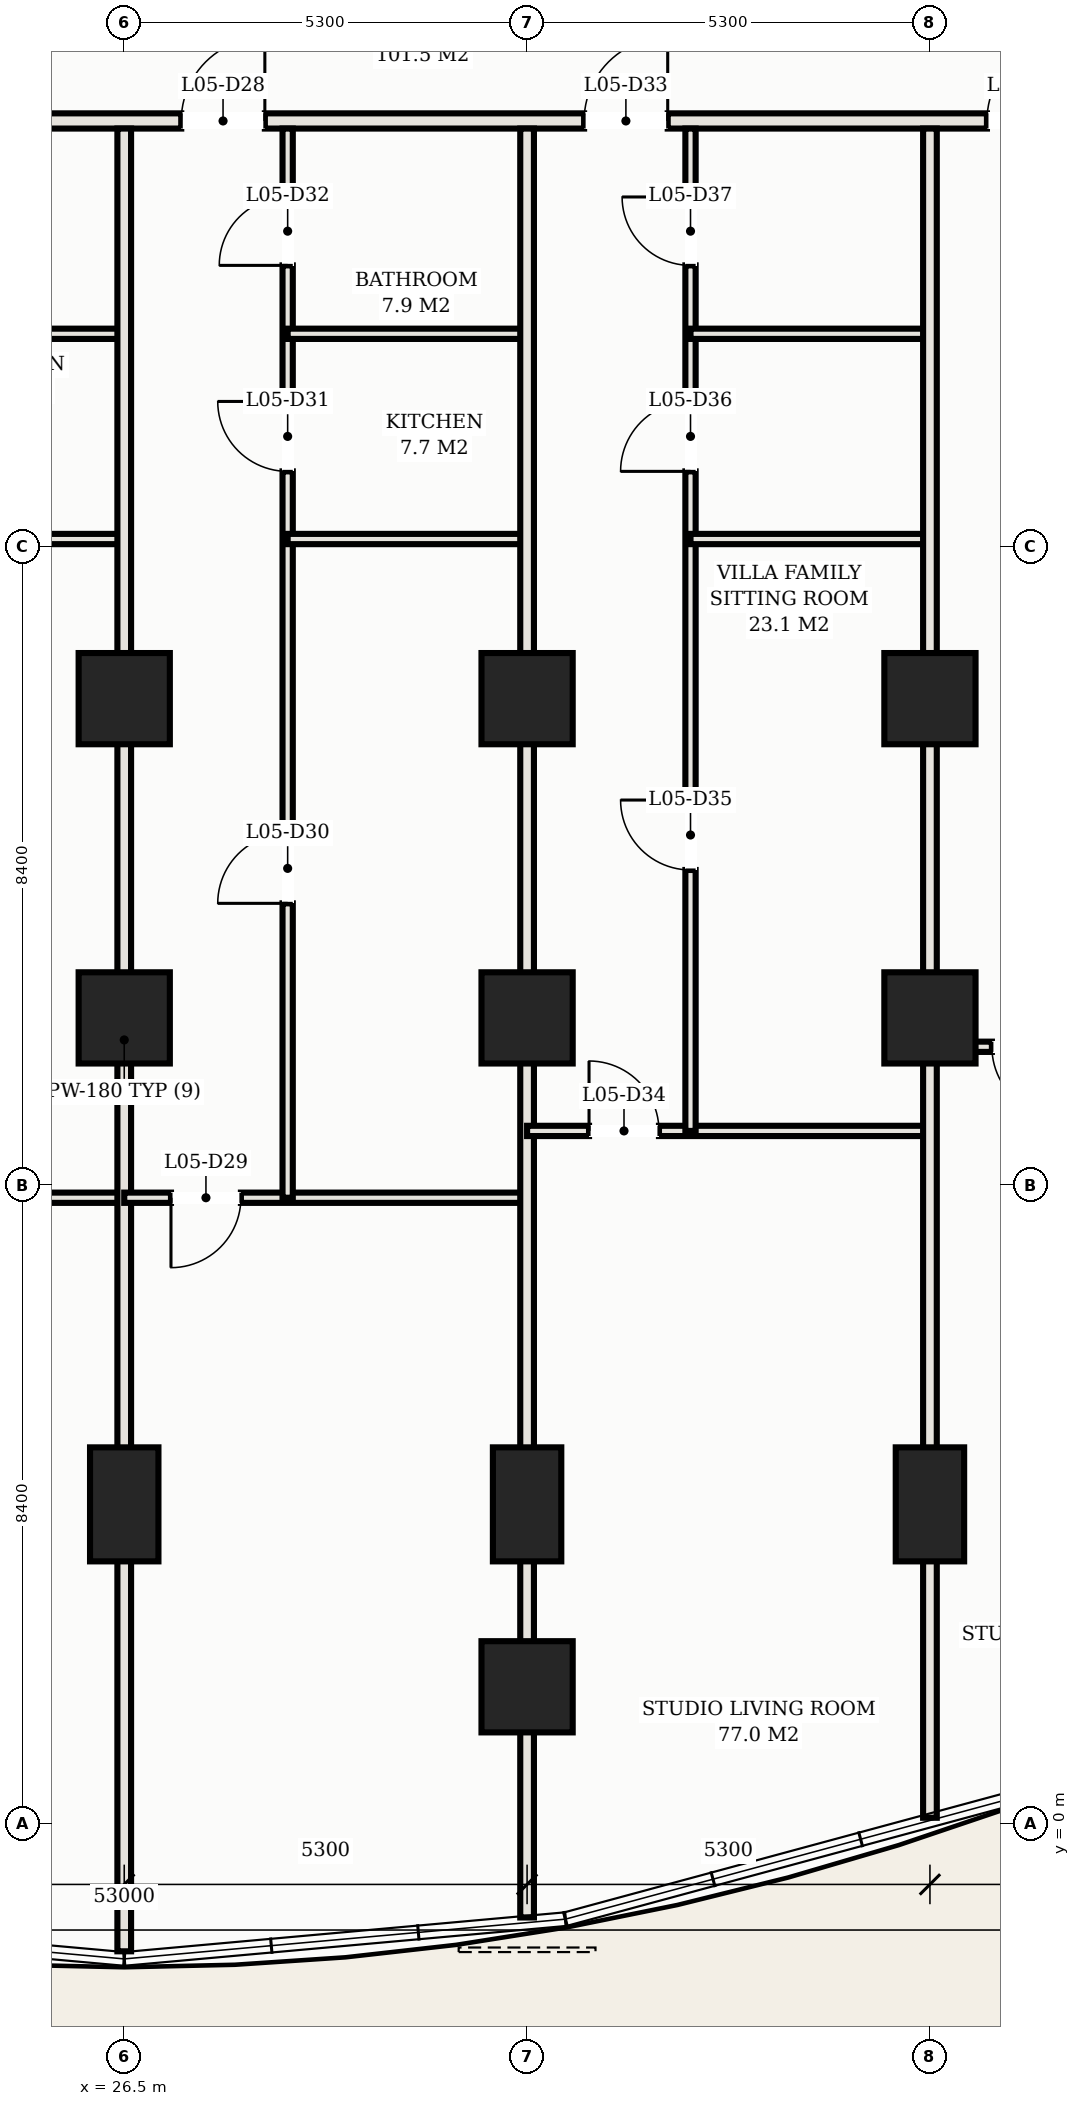
"""IFC4 building model, lengths in metres.
Left out: names, types, materials, properties, quantities, classifications, styles, units other than length and angle.
Written with IfcOpenShell. Run it as: python <this file> out.ifc"""

import sys

from ifc_helpers import new_model, si_unit, direction, frame, frame_2d, origin, origin_2d, place, context, subcontext, project, spatial, rectangle, hollow_rectangle, extrude, element, fill, save


model = new_model("IFC4")
c1 = context("Model", 3, precision=1e-05, world=origin(), true_north=direction((0.0, 1.0)))
c2 = subcontext(c1, "Body", "Model", "MODEL_VIEW")
j1 = project(units=[si_unit("LENGTHUNIT", "METRE"), si_unit("PLANEANGLEUNIT", "RADIAN")], contexts=[c1])
p1 = place(None, origin())
s1 = spatial("IfcSite", under=j1, at=p1, CompositionType="ELEMENT")
p2 = place(p1, origin())
s2 = spatial("IfcBuilding", under=s1, at=p2, CompositionType="ELEMENT")
p3 = place(p2, frame((0.0, 0.0, 24.2)))
s3 = spatial("IfcBuildingStorey", under=s2, at=p3, CompositionType="ELEMENT", Elevation=24.2)
for number, where, z_axis, x_axis in (
    (1, (26.5, 14.8, 0.0), (0.0, 0.0, 1.0), (1.0, 0.0, 0.0)),
    (2, (26.5, 10.6, 0.0), (0.0, 0.0, 1.0), (1.0, 0.0, 0.0)),
    (3, (31.8, 14.8, 0.0), (0.0, 0.0, 1.0), (1.0, 0.0, 0.0)),
    (4, (31.8, 10.6, 0.0), (0.0, 0.0, 1.0), (1.0, 0.0, 0.0)),
    (5, (37.1, 14.8, 0.0), (0.0, 0.0, 1.0), (1.0, 0.0, 0.0)),
    (6, (37.1, 10.6, 0.0), (0.0, 0.0, 1.0), (1.0, 0.0, 0.0)),
    (7, (31.8, 1.8, 0.0), (0.0, 0.0, 1.0), (1.0, 0.0, 0.0)),
):
    element("IfcColumn", number, at=place(p3, frame(where, z_axis=z_axis, x_axis=x_axis)), inside=s3, PredefinedType="COLUMN", context=c2, shape_type="SweptSolid", body=[
        extrude(hollow_rectangle(XDim=1.2, YDim=1.2, WallThickness=0.04, at=origin_2d()), origin(), (0.0, 0.0, 1.0), 3.3),
    ])
for number, where, z_axis, x_axis in (
    (8, (26.5, 4.2, 0.0), (0.0, 0.0, 1.0), (1.0, 0.0, 0.0)),
    (9, (31.8, 4.2, 0.0), (0.0, 0.0, 1.0), (1.0, 0.0, 0.0)),
    (10, (37.1, 4.2, 0.0), (0.0, 0.0, 1.0), (1.0, 0.0, 0.0)),
):
    element("IfcColumn", number, at=place(p3, frame(where, z_axis=z_axis, x_axis=x_axis)), inside=s3, PredefinedType="COLUMN", context=c2, shape_type="SweptSolid", body=[
        extrude(hollow_rectangle(XDim=0.9, YDim=1.5, WallThickness=0.036, at=origin_2d()), origin(), (0.0, 0.0, 1.0), 3.3),
    ])
p4 = place(p3, frame((0.12, 22.4, 0.0), z_axis=(0.0, 0.0, 1.0), x_axis=(1.0, 0.0, 0.0)))
e11 = element("IfcWall", 11, at=p4, inside=s3, PredefinedType="PARTITIONING", context=c2, shape_type="SweptSolid", body=[
    extrude(rectangle(XDim=52.76, YDim=0.2, at=frame_2d((26.38, 0.0))), origin(), (0.0, 0.0, 1.0), 2.57),
])
p5 = place(p4, frame((11.23, 0.0, 0.0)))
e12 = element("IfcOpeningElement", 12, at=p5, cuts=e11, PredefinedType="OPENING", context=c2, shape_type="SweptSolid", body=[
    extrude(rectangle(XDim=1.1, YDim=2.25, at=frame_2d((0.55, 1.125))), frame((0.0, 0.11, 0.0), z_axis=(0.0, -1.0, 0.0), x_axis=(1.0, 0.0, 0.0)), (0.0, 0.0, 1.0), 0.22),
])
p6 = place(p4, frame((16.53, 0.0, 0.0)))
e13 = element("IfcOpeningElement", 13, at=p6, cuts=e11, PredefinedType="OPENING", context=c2, shape_type="SweptSolid", body=[
    extrude(rectangle(XDim=1.1, YDim=2.25, at=frame_2d((0.55, 1.125))), frame((0.0, 0.11, 0.0), z_axis=(0.0, -1.0, 0.0), x_axis=(1.0, 0.0, 0.0)), (0.0, 0.0, 1.0), 0.22),
])
p7 = place(p4, frame((21.83, 0.0, 0.0)))
e14 = element("IfcOpeningElement", 14, at=p7, cuts=e11, PredefinedType="OPENING", context=c2, shape_type="SweptSolid", body=[
    extrude(rectangle(XDim=1.1, YDim=2.25, at=frame_2d((0.55, 1.125))), frame((0.0, 0.11, 0.0), z_axis=(0.0, -1.0, 0.0), x_axis=(1.0, 0.0, 0.0)), (0.0, 0.0, 1.0), 0.22),
])
p8 = place(p4, frame((27.13, 0.0, 0.0)))
e15 = element("IfcOpeningElement", 15, at=p8, cuts=e11, PredefinedType="OPENING", context=c2, shape_type="SweptSolid", body=[
    extrude(rectangle(XDim=1.1, YDim=2.25, at=frame_2d((0.55, 1.125))), frame((0.0, 0.11, 0.0), z_axis=(0.0, -1.0, 0.0), x_axis=(1.0, 0.0, 0.0)), (0.0, 0.0, 1.0), 0.22),
])
p9 = place(p4, frame((32.43, 0.0, 0.0)))
e16 = element("IfcOpeningElement", 16, at=p9, cuts=e11, PredefinedType="OPENING", context=c2, shape_type="SweptSolid", body=[
    extrude(rectangle(XDim=1.1, YDim=2.25, at=frame_2d((0.55, 1.125))), frame((0.0, 0.11, 0.0), z_axis=(0.0, -1.0, 0.0), x_axis=(1.0, 0.0, 0.0)), (0.0, 0.0, 1.0), 0.22),
])
p10 = place(p4, frame((37.73, 0.0, 0.0)))
e17 = element("IfcOpeningElement", 17, at=p10, cuts=e11, PredefinedType="OPENING", context=c2, shape_type="SweptSolid", body=[
    extrude(rectangle(XDim=1.1, YDim=2.25, at=frame_2d((0.55, 1.125))), frame((0.0, 0.11, 0.0), z_axis=(0.0, -1.0, 0.0), x_axis=(1.0, 0.0, 0.0)), (0.0, 0.0, 1.0), 0.22),
])
p11 = place(p4, frame((4.735, 0.0, 0.0)))
e18 = element("IfcOpeningElement", 18, at=p11, cuts=e11, PredefinedType="OPENING", context=c2, shape_type="SweptSolid", body=[
    extrude(rectangle(XDim=0.92, YDim=2.15, at=frame_2d((0.46, 1.075))), frame((0.0, 0.11, 0.0), z_axis=(0.0, -1.0, 0.0), x_axis=(1.0, 0.0, 0.0)), (0.0, 0.0, 1.0), 0.22),
])
p12 = place(p4, frame((47.105, 0.0, 0.0)))
e19 = element("IfcOpeningElement", 19, at=p12, cuts=e11, PredefinedType="OPENING", context=c2, shape_type="SweptSolid", body=[
    extrude(rectangle(XDim=0.92, YDim=2.15, at=frame_2d((0.46, 1.075))), frame((0.0, 0.11, 0.0), z_axis=(0.0, -1.0, 0.0), x_axis=(1.0, 0.0, 0.0)), (0.0, 0.0, 1.0), 0.22),
])
p13 = place(p3, frame((21.2, 8.234, 0.0), z_axis=(0.0, 0.0, 1.0), x_axis=(1.0, 0.0, 0.0)))
e20 = element("IfcWall", 20, at=p13, inside=s3, PredefinedType="PARTITIONING", context=c2, shape_type="SweptSolid", body=[
    extrude(rectangle(XDim=5.3, YDim=0.135, at=frame_2d((2.65, 0.0))), origin(), (0.0, 0.0, 1.0), 2.57),
])
p14 = place(p13, frame((0.615, 0.0, 0.0)))
e21 = element("IfcOpeningElement", 21, at=p14, cuts=e20, PredefinedType="OPENING", context=c2, shape_type="SweptSolid", body=[
    extrude(rectangle(XDim=0.92, YDim=2.15, at=frame_2d((0.46, 1.075))), frame((0.0, 0.078, 0.0), z_axis=(0.0, -1.0, 0.0), x_axis=(1.0, 0.0, 0.0)), (0.0, 0.0, 1.0), 0.155),
])
for number, where, z_axis, x_axis in (
    (22, (23.35, 16.9, 0.0), (0.0, 0.0, 1.0), (1.0, 0.0, 0.0)),
    (23, (23.35, 19.6, 0.0), (0.0, 0.0, 1.0), (1.0, 0.0, 0.0)),
):
    element("IfcWall", number, at=place(p3, frame(where, z_axis=z_axis, x_axis=x_axis)), inside=s3, PredefinedType="PARTITIONING", context=c2, shape_type="SweptSolid", body=[
        extrude(rectangle(XDim=3.15, YDim=0.135, at=frame_2d((1.575, 0.0))), origin(), (0.0, 0.0, 1.0), 2.57),
    ])
p15 = place(p3, frame((26.5, -1.68, 0.0), z_axis=(0.0, 0.0, 1.0), x_axis=(0.0, 1.0, 0.0)))
e24 = element("IfcWall", 24, at=p15, inside=s3, PredefinedType="PARTITIONING", context=c2, shape_type="SweptSolid", body=[
    extrude(rectangle(XDim=23.98, YDim=0.18, at=frame_2d((11.99, 0.0))), origin(), (0.0, 0.0, 1.0), 2.275),
])
p16 = place(p3, frame((26.5, 8.234, 0.0), z_axis=(0.0, 0.0, 1.0), x_axis=(1.0, 0.0, 0.0)))
e25 = element("IfcWall", 25, at=p16, inside=s3, PredefinedType="PARTITIONING", context=c2, shape_type="SweptSolid", body=[
    extrude(rectangle(XDim=5.3, YDim=0.135, at=frame_2d((2.65, 0.0))), origin(), (0.0, 0.0, 1.0), 2.57),
])
p17 = place(p16, frame((0.615, 0.0, 0.0)))
e26 = element("IfcOpeningElement", 26, at=p17, cuts=e25, PredefinedType="OPENING", context=c2, shape_type="SweptSolid", body=[
    extrude(rectangle(XDim=0.92, YDim=2.15, at=frame_2d((0.46, 1.075))), frame((0.0, 0.078, 0.0), z_axis=(0.0, -1.0, 0.0), x_axis=(1.0, 0.0, 0.0)), (0.0, 0.0, 1.0), 0.155),
])
p18 = place(p3, frame((28.65, 8.234, 0.0), z_axis=(0.0, 0.0, 1.0), x_axis=(0.0, 1.0, 0.0)))
e27 = element("IfcWall", 27, at=p18, inside=s3, PredefinedType="PARTITIONING", context=c2, shape_type="SweptSolid", body=[
    extrude(rectangle(XDim=14.066, YDim=0.135, at=frame_2d((7.033, 0.0))), origin(), (0.0, 0.0, 1.0), 2.57),
])
p19 = place(p18, frame((3.873, 0.0, 0.0)))
e28 = element("IfcOpeningElement", 28, at=p19, cuts=e27, PredefinedType="OPENING", context=c2, shape_type="SweptSolid", body=[
    extrude(rectangle(XDim=0.92, YDim=2.15, at=frame_2d((0.46, 1.075))), frame((0.0, 0.078, 0.0), z_axis=(0.0, -1.0, 0.0), x_axis=(1.0, 0.0, 0.0)), (0.0, 0.0, 1.0), 0.155),
])
p20 = place(p18, frame((9.556, 0.0, 0.0)))
e29 = element("IfcOpeningElement", 29, at=p20, cuts=e27, PredefinedType="OPENING", context=c2, shape_type="SweptSolid", body=[
    extrude(rectangle(XDim=0.92, YDim=2.15, at=frame_2d((0.46, 1.075))), frame((0.0, 0.078, 0.0), z_axis=(0.0, -1.0, 0.0), x_axis=(1.0, 0.0, 0.0)), (0.0, 0.0, 1.0), 0.155),
])
p21 = place(p18, frame((12.266, 0.0, 0.0)))
e30 = element("IfcOpeningElement", 30, at=p21, cuts=e27, PredefinedType="OPENING", context=c2, shape_type="SweptSolid", body=[
    extrude(rectangle(XDim=0.9, YDim=2.15, at=frame_2d((0.45, 1.075))), frame((0.0, 0.078, 0.0), z_axis=(0.0, -1.0, 0.0), x_axis=(1.0, 0.0, 0.0)), (0.0, 0.0, 1.0), 0.155),
])
for number, where, z_axis, x_axis in (
    (31, (28.65, 16.9, 0.0), (0.0, 0.0, 1.0), (1.0, 0.0, 0.0)),
    (32, (28.65, 19.6, 0.0), (0.0, 0.0, 1.0), (1.0, 0.0, 0.0)),
):
    element("IfcWall", number, at=place(p3, frame(where, z_axis=z_axis, x_axis=x_axis)), inside=s3, PredefinedType="PARTITIONING", context=c2, shape_type="SweptSolid", body=[
        extrude(rectangle(XDim=3.15, YDim=0.135, at=frame_2d((1.575, 0.0))), origin(), (0.0, 0.0, 1.0), 2.57),
    ])
p22 = place(p3, frame((31.8, -1.235, 0.0), z_axis=(0.0, 0.0, 1.0), x_axis=(0.0, 1.0, 0.0)))
e33 = element("IfcWall", 33, at=p22, inside=s3, PredefinedType="PARTITIONING", context=c2, shape_type="SweptSolid", body=[
    extrude(rectangle(XDim=23.535, YDim=0.18, at=frame_2d((11.768, 0.0))), origin(), (0.0, 0.0, 1.0), 2.275),
])
p23 = place(p3, frame((31.8, 9.113, 0.0), z_axis=(0.0, 0.0, 1.0), x_axis=(1.0, 0.0, 0.0)))
e34 = element("IfcWall", 34, at=p23, inside=s3, PredefinedType="PARTITIONING", context=c2, shape_type="SweptSolid", body=[
    extrude(rectangle(XDim=5.3, YDim=0.135, at=frame_2d((2.65, 0.0))), origin(), (0.0, 0.0, 1.0), 2.57),
])
p24 = place(p23, frame((0.815, 0.0, 0.0)))
e35 = element("IfcOpeningElement", 35, at=p24, cuts=e34, PredefinedType="OPENING", context=c2, shape_type="SweptSolid", body=[
    extrude(rectangle(XDim=0.92, YDim=2.15, at=frame_2d((0.46, 1.075))), frame((0.0, 0.078, 0.0), z_axis=(0.0, -1.0, 0.0), x_axis=(1.0, 0.0, 0.0)), (0.0, 0.0, 1.0), 0.155),
])
p25 = place(p3, frame((33.95, 9.113, 0.0), z_axis=(0.0, 0.0, 1.0), x_axis=(0.0, 1.0, 0.0)))
e36 = element("IfcWall", 36, at=p25, inside=s3, PredefinedType="PARTITIONING", context=c2, shape_type="SweptSolid", body=[
    extrude(rectangle(XDim=13.187, YDim=0.135, at=frame_2d((6.594, 0.0))), origin(), (0.0, 0.0, 1.0), 2.57),
])
p26 = place(p25, frame((3.433, 0.0, 0.0)))
e37 = element("IfcOpeningElement", 37, at=p26, cuts=e36, PredefinedType="OPENING", context=c2, shape_type="SweptSolid", body=[
    extrude(rectangle(XDim=0.92, YDim=2.15, at=frame_2d((0.46, 1.075))), frame((0.0, 0.078, 0.0), z_axis=(0.0, -1.0, 0.0), x_axis=(1.0, 0.0, 0.0)), (0.0, 0.0, 1.0), 0.155),
])
p27 = place(p25, frame((8.677, 0.0, 0.0)))
e38 = element("IfcOpeningElement", 38, at=p27, cuts=e36, PredefinedType="OPENING", context=c2, shape_type="SweptSolid", body=[
    extrude(rectangle(XDim=0.92, YDim=2.15, at=frame_2d((0.46, 1.075))), frame((0.0, 0.078, 0.0), z_axis=(0.0, -1.0, 0.0), x_axis=(1.0, 0.0, 0.0)), (0.0, 0.0, 1.0), 0.155),
])
p28 = place(p25, frame((11.387, 0.0, 0.0)))
e39 = element("IfcOpeningElement", 39, at=p28, cuts=e36, PredefinedType="OPENING", context=c2, shape_type="SweptSolid", body=[
    extrude(rectangle(XDim=0.9, YDim=2.15, at=frame_2d((0.45, 1.075))), frame((0.0, 0.078, 0.0), z_axis=(0.0, -1.0, 0.0), x_axis=(1.0, 0.0, 0.0)), (0.0, 0.0, 1.0), 0.155),
])
for number, where, z_axis, x_axis in (
    (40, (33.95, 16.9, 0.0), (0.0, 0.0, 1.0), (1.0, 0.0, 0.0)),
    (41, (33.95, 19.6, 0.0), (0.0, 0.0, 1.0), (1.0, 0.0, 0.0)),
):
    element("IfcWall", number, at=place(p3, frame(where, z_axis=z_axis, x_axis=x_axis)), inside=s3, PredefinedType="PARTITIONING", context=c2, shape_type="SweptSolid", body=[
        extrude(rectangle(XDim=3.15, YDim=0.135, at=frame_2d((1.575, 0.0))), origin(), (0.0, 0.0, 1.0), 2.57),
    ])
p29 = place(p3, frame((37.1, 0.077, 0.0), z_axis=(0.0, 0.0, 1.0), x_axis=(0.0, 1.0, 0.0)))
e42 = element("IfcWall", 42, at=p29, inside=s3, PredefinedType="PARTITIONING", context=c2, shape_type="SweptSolid", body=[
    extrude(rectangle(XDim=22.223, YDim=0.18, at=frame_2d((11.112, 0.0))), origin(), (0.0, 0.0, 1.0), 2.275),
])
p30 = place(p3, frame((37.1, 10.22, 0.0), z_axis=(0.0, 0.0, 1.0), x_axis=(1.0, 0.0, 0.0)))
e43 = element("IfcWall", 43, at=p30, inside=s3, PredefinedType="PARTITIONING", context=c2, shape_type="SweptSolid", body=[
    extrude(rectangle(XDim=5.3, YDim=0.135, at=frame_2d((2.65, 0.0))), origin(), (0.0, 0.0, 1.0), 2.57),
])
p31 = place(p30, frame((0.815, 0.0, 0.0)))
e44 = element("IfcOpeningElement", 44, at=p31, cuts=e43, PredefinedType="OPENING", context=c2, shape_type="SweptSolid", body=[
    extrude(rectangle(XDim=0.92, YDim=2.15, at=frame_2d((0.46, 1.075))), frame((0.0, 0.078, 0.0), z_axis=(0.0, -1.0, 0.0), x_axis=(1.0, 0.0, 0.0)), (0.0, 0.0, 1.0), 0.155),
])
p32 = place(p8, origin())
e45 = element("IfcDoor", 45, at=p32, inside=s3, OperationType="SINGLE_SWING_RIGHT", PredefinedType="DOOR", context=c2, shape_type="SweptSolid", body=[
    extrude(rectangle(XDim=1.1, YDim=2.25, at=frame_2d((0.55, 1.125))), frame((0.0, 0.025, 0.0), z_axis=(0.0, -1.0, 0.0), x_axis=(1.0, 0.0, 0.0)), (0.0, 0.0, 1.0), 0.05),
])
fill(e15, e45)
p33 = place(p17, frame((0.92, 0.0, 0.0), z_axis=(0.0, 0.0, 1.0), x_axis=(-1.0, 0.0, 0.0)))
e46 = element("IfcDoor", 46, at=p33, inside=s3, OperationType="SINGLE_SWING_RIGHT", PredefinedType="DOOR", context=c2, shape_type="SweptSolid", body=[
    extrude(rectangle(XDim=0.92, YDim=2.15, at=frame_2d((0.46, 1.075))), frame((0.0, 0.025, 0.0), z_axis=(0.0, -1.0, 0.0), x_axis=(1.0, 0.0, 0.0)), (0.0, 0.0, 1.0), 0.05),
])
fill(e26, e46)
p34 = place(p19, origin())
e47 = element("IfcDoor", 47, at=p34, inside=s3, OperationType="SINGLE_SWING_LEFT", PredefinedType="DOOR", context=c2, shape_type="SweptSolid", body=[
    extrude(rectangle(XDim=0.92, YDim=2.15, at=frame_2d((0.46, 1.075))), frame((0.0, 0.025, 0.0), z_axis=(0.0, -1.0, 0.0), x_axis=(1.0, 0.0, 0.0)), (0.0, 0.0, 1.0), 0.05),
])
fill(e28, e47)
p35 = place(p20, origin())
e48 = element("IfcDoor", 48, at=p35, inside=s3, OperationType="SINGLE_SWING_RIGHT", PredefinedType="DOOR", context=c2, shape_type="SweptSolid", body=[
    extrude(rectangle(XDim=0.92, YDim=2.15, at=frame_2d((0.46, 1.075))), frame((0.0, 0.025, 0.0), z_axis=(0.0, -1.0, 0.0), x_axis=(1.0, 0.0, 0.0)), (0.0, 0.0, 1.0), 0.05),
])
fill(e29, e48)
p36 = place(p21, origin())
e49 = element("IfcDoor", 49, at=p36, inside=s3, OperationType="SINGLE_SWING_LEFT", PredefinedType="DOOR", context=c2, shape_type="SweptSolid", body=[
    extrude(rectangle(XDim=0.9, YDim=2.15, at=frame_2d((0.45, 1.075))), frame((0.0, 0.025, 0.0), z_axis=(0.0, -1.0, 0.0), x_axis=(1.0, 0.0, 0.0)), (0.0, 0.0, 1.0), 0.05),
])
fill(e30, e49)
p37 = place(p9, origin())
e50 = element("IfcDoor", 50, at=p37, inside=s3, OperationType="SINGLE_SWING_RIGHT", PredefinedType="DOOR", context=c2, shape_type="SweptSolid", body=[
    extrude(rectangle(XDim=1.1, YDim=2.25, at=frame_2d((0.55, 1.125))), frame((0.0, 0.025, 0.0), z_axis=(0.0, -1.0, 0.0), x_axis=(1.0, 0.0, 0.0)), (0.0, 0.0, 1.0), 0.05),
])
fill(e16, e50)
p38 = place(p24, origin())
e51 = element("IfcDoor", 51, at=p38, inside=s3, OperationType="SINGLE_SWING_LEFT", PredefinedType="DOOR", context=c2, shape_type="SweptSolid", body=[
    extrude(rectangle(XDim=0.92, YDim=2.15, at=frame_2d((0.46, 1.075))), frame((0.0, 0.025, 0.0), z_axis=(0.0, -1.0, 0.0), x_axis=(1.0, 0.0, 0.0)), (0.0, 0.0, 1.0), 0.05),
])
fill(e35, e51)
p39 = place(p26, origin())
e52 = element("IfcDoor", 52, at=p39, inside=s3, OperationType="SINGLE_SWING_RIGHT", PredefinedType="DOOR", context=c2, shape_type="SweptSolid", body=[
    extrude(rectangle(XDim=0.92, YDim=2.15, at=frame_2d((0.46, 1.075))), frame((0.0, 0.025, 0.0), z_axis=(0.0, -1.0, 0.0), x_axis=(1.0, 0.0, 0.0)), (0.0, 0.0, 1.0), 0.05),
])
fill(e37, e52)
p40 = place(p27, origin())
e53 = element("IfcDoor", 53, at=p40, inside=s3, OperationType="SINGLE_SWING_LEFT", PredefinedType="DOOR", context=c2, shape_type="SweptSolid", body=[
    extrude(rectangle(XDim=0.92, YDim=2.15, at=frame_2d((0.46, 1.075))), frame((0.0, 0.025, 0.0), z_axis=(0.0, -1.0, 0.0), x_axis=(1.0, 0.0, 0.0)), (0.0, 0.0, 1.0), 0.05),
])
fill(e38, e53)
p41 = place(p28, origin())
e54 = element("IfcDoor", 54, at=p41, inside=s3, OperationType="SINGLE_SWING_RIGHT", PredefinedType="DOOR", context=c2, shape_type="SweptSolid", body=[
    extrude(rectangle(XDim=0.9, YDim=2.15, at=frame_2d((0.45, 1.075))), frame((0.0, 0.025, 0.0), z_axis=(0.0, -1.0, 0.0), x_axis=(1.0, 0.0, 0.0)), (0.0, 0.0, 1.0), 0.05),
])
fill(e39, e54)
p42 = place(p10, origin())
e55 = element("IfcDoor", 55, at=p42, inside=s3, OperationType="SINGLE_SWING_RIGHT", PredefinedType="DOOR", context=c2, shape_type="SweptSolid", body=[
    extrude(rectangle(XDim=1.1, YDim=2.25, at=frame_2d((0.55, 1.125))), frame((0.0, 0.025, 0.0), z_axis=(0.0, -1.0, 0.0), x_axis=(1.0, 0.0, 0.0)), (0.0, 0.0, 1.0), 0.05),
])
fill(e17, e55)
p43 = place(p31, frame((0.92, 0.0, 0.0), z_axis=(0.0, 0.0, 1.0), x_axis=(-1.0, 0.0, 0.0)))
e56 = element("IfcDoor", 56, at=p43, inside=s3, OperationType="SINGLE_SWING_LEFT", PredefinedType="DOOR", context=c2, shape_type="SweptSolid", body=[
    extrude(rectangle(XDim=0.92, YDim=2.15, at=frame_2d((0.46, 1.075))), frame((0.0, 0.025, 0.0), z_axis=(0.0, -1.0, 0.0), x_axis=(1.0, 0.0, 0.0)), (0.0, 0.0, 1.0), 0.05),
])
fill(e44, e56)
save(model, sys.argv[1])
